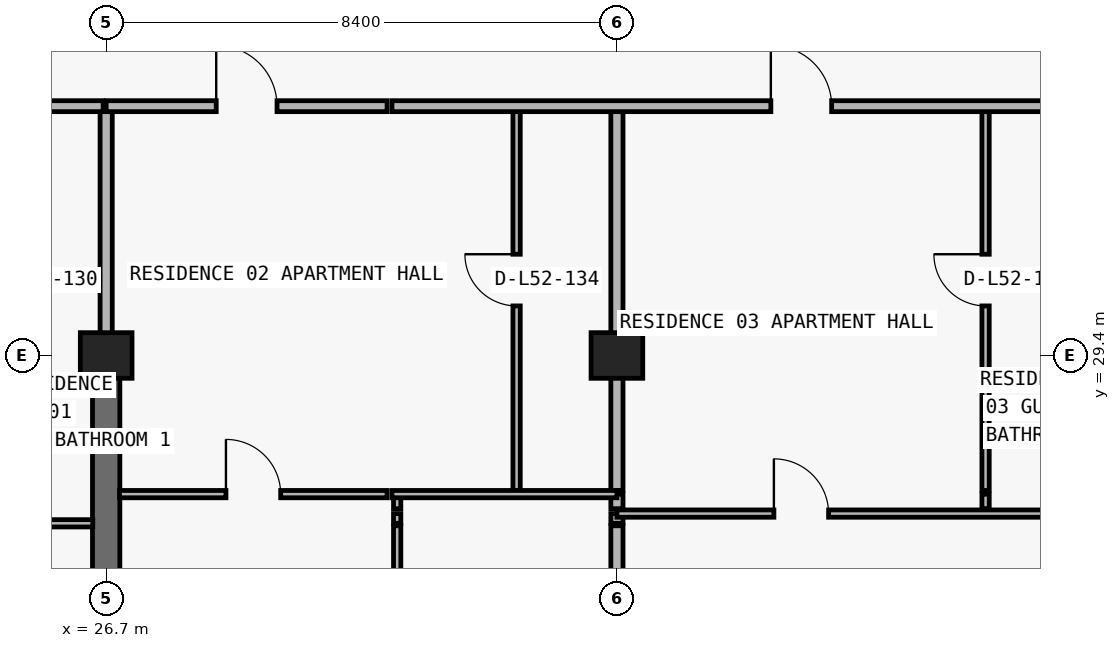
"""IFC4 building model, lengths in metres.
Left out: names, types, materials, properties, quantities, classifications, styles, units other than length and angle.
Written with IfcOpenShell. Run it as: python <this file> out.ifc"""

import sys

from ifc_helpers import new_model, si_unit, direction, frame, frame_2d, origin, origin_2d, place, context, subcontext, project, spatial, rectangle, extrude, element, fill, save


model = new_model("IFC4")
c1 = context("Model", 3, precision=1e-05, world=origin(), true_north=direction((0.0, 1.0)))
c2 = subcontext(c1, "Body", "Model", "MODEL_VIEW")
j1 = project(units=[si_unit("LENGTHUNIT", "METRE"), si_unit("PLANEANGLEUNIT", "RADIAN")], contexts=[c1])
p1 = place(None, origin())
s1 = spatial("IfcSite", under=j1, at=p1, CompositionType="ELEMENT")
p2 = place(p1, origin())
s2 = spatial("IfcBuilding", under=s1, at=p2, CompositionType="ELEMENT")
p3 = place(p2, frame((0.0, 0.0, 188.4)))
s3 = spatial("IfcBuildingStorey", under=s2, at=p3, CompositionType="ELEMENT", Elevation=188.4)
for number, where, z_axis, x_axis in (
    (1, (26.7, 29.4, 0.0), (0.0, 0.0, 1.0), (1.0, 0.0, 0.0)),
    (2, (35.1, 29.4, 0.0), (0.0, 0.0, 1.0), (1.0, 0.0, 0.0)),
):
    element("IfcColumn", number, at=place(p3, frame(where, z_axis=z_axis, x_axis=x_axis)), inside=s3, PredefinedType="COLUMN", context=c2, shape_type="SweptSolid", body=[
        extrude(rectangle(XDim=0.85, YDim=0.75, at=origin_2d()), origin(), (0.0, 0.0, 1.0), 3.05),
    ])
p4 = place(p3, frame((26.7, 20.8, 0.0), z_axis=(0.0, 0.0, 1.0), x_axis=(0.0, 1.0, 0.0)))
e3 = element("IfcWall", 3, at=p4, inside=s3, PredefinedType="SHEAR", context=c2, shape_type="SweptSolid", body=[
    extrude(rectangle(XDim=8.6, YDim=0.45, at=frame_2d((4.3, 0.0))), origin(), (0.0, 0.0, 1.0), 3.05),
])
p5 = place(p3, frame((26.7, 29.405, 0.0), z_axis=(0.0, 0.0, 1.0), x_axis=(0.0, 1.0, 0.0)))
e4 = element("IfcWall", 4, at=p5, inside=s3, PredefinedType="PARTITIONING", context=c2, shape_type="SweptSolid", body=[
    extrude(rectangle(XDim=4.095, YDim=0.2, at=frame_2d((2.047, 0.0))), origin(), (0.0, 0.0, 1.0), 2.335),
])
p6 = place(p3, frame((31.486, 22.24, 0.0), z_axis=(0.0, 0.0, 1.0), x_axis=(0.0, 1.0, 0.0)))
e5 = element("IfcWall", 5, at=p6, inside=s3, PredefinedType="PARTITIONING", context=c2, shape_type="SweptSolid", body=[
    extrude(rectangle(XDim=4.36, YDim=0.12, at=frame_2d((2.18, 0.0))), origin(), (0.0, 0.0, 1.0), 3.05),
])
p7 = place(p6, frame((1.73, 0.0, 0.0)))
e6 = element("IfcOpeningElement", 6, at=p7, cuts=e5, PredefinedType="OPENING", context=c2, shape_type="SweptSolid", body=[
    extrude(rectangle(XDim=0.9, YDim=2.15, at=frame_2d((0.45, 1.075))), frame((0.0, 0.07, 0.0), z_axis=(0.0, -1.0, 0.0), x_axis=(1.0, 0.0, 0.0)), (0.0, 0.0, 1.0), 0.14),
])
p8 = place(p3, frame((31.486, 26.64, 0.0), z_axis=(0.0, 0.0, 1.0), x_axis=(0.0, 1.0, 0.0)))
e7 = element("IfcWall", 7, at=p8, inside=s3, PredefinedType="PARTITIONING", context=c2, shape_type="SweptSolid", body=[
    extrude(rectangle(XDim=0.16, YDim=0.12, at=frame_2d((0.08, 0.0))), origin(), (0.0, 0.0, 1.0), 3.05),
])
p9 = place(p3, frame((31.486, 26.88, 0.0), z_axis=(0.0, 0.0, 1.0), x_axis=(0.0, 1.0, 0.0)))
e8 = element("IfcWall", 8, at=p9, inside=s3, PredefinedType="PARTITIONING", context=c2, shape_type="SweptSolid", body=[
    extrude(rectangle(XDim=0.24, YDim=0.12, at=frame_2d((0.12, 0.0))), origin(), (0.0, 0.0, 1.0), 3.05),
])
p10 = place(p3, frame((33.45, 27.18, 0.0), z_axis=(0.0, 0.0, 1.0), x_axis=(0.0, 1.0, 0.0)))
e9 = element("IfcWall", 9, at=p10, inside=s3, PredefinedType="PARTITIONING", context=c2, shape_type="SweptSolid", body=[
    extrude(rectangle(XDim=6.32, YDim=0.12, at=frame_2d((3.16, 0.0))), origin(), (0.0, 0.0, 1.0), 3.05),
])
p11 = place(p10, frame((3.035, 0.0, 0.0)))
e10 = element("IfcOpeningElement", 10, at=p11, cuts=e9, PredefinedType="OPENING", context=c2, shape_type="SweptSolid", body=[
    extrude(rectangle(XDim=0.85, YDim=2.1, at=frame_2d((0.425, 1.05))), frame((0.0, 0.07, 0.0), z_axis=(0.0, -1.0, 0.0), x_axis=(1.0, 0.0, 0.0)), (0.0, 0.0, 1.0), 0.14),
])
p12 = place(p3, frame((35.1, 22.24, 0.0), z_axis=(0.0, 0.0, 1.0), x_axis=(0.0, 1.0, 0.0)))
e11 = element("IfcWall", 11, at=p12, inside=s3, PredefinedType="PARTITIONING", context=c2, shape_type="SweptSolid", body=[
    extrude(rectangle(XDim=4.36, YDim=0.2, at=frame_2d((2.18, 0.0))), origin(), (0.0, 0.0, 1.0), 2.263),
])
p13 = place(p3, frame((35.1, 26.64, 0.0), z_axis=(0.0, 0.0, 1.0), x_axis=(0.0, 1.0, 0.0)))
e12 = element("IfcWall", 12, at=p13, inside=s3, PredefinedType="PARTITIONING", context=c2, shape_type="SweptSolid", body=[
    extrude(rectangle(XDim=0.16, YDim=0.2, at=frame_2d((0.08, 0.0))), origin(), (0.0, 0.0, 1.0), 2.263),
])
p14 = place(p3, frame((35.1, 26.88, 0.0), z_axis=(0.0, 0.0, 1.0), x_axis=(0.0, 1.0, 0.0)))
e13 = element("IfcWall", 13, at=p14, inside=s3, PredefinedType="PARTITIONING", context=c2, shape_type="SweptSolid", body=[
    extrude(rectangle(XDim=0.24, YDim=0.2, at=frame_2d((0.12, 0.0))), origin(), (0.0, 0.0, 1.0), 2.263),
])
p15 = place(p3, frame((35.1, 27.18, 0.0), z_axis=(0.0, 0.0, 1.0), x_axis=(0.0, 1.0, 0.0)))
e14 = element("IfcWall", 14, at=p15, inside=s3, PredefinedType="PARTITIONING", context=c2, shape_type="SweptSolid", body=[
    extrude(rectangle(XDim=6.32, YDim=0.2, at=frame_2d((3.16, 0.0))), origin(), (0.0, 0.0, 1.0), 2.263),
])
p16 = place(p3, frame((41.163, 26.88, 0.0), z_axis=(0.0, 0.0, 1.0), x_axis=(0.0, 1.0, 0.0)))
e15 = element("IfcWall", 15, at=p16, inside=s3, PredefinedType="PARTITIONING", context=c2, shape_type="SweptSolid", body=[
    extrude(rectangle(XDim=0.24, YDim=0.12, at=frame_2d((0.12, 0.0))), origin(), (0.0, 0.0, 1.0), 3.05),
])
p17 = place(p3, frame((41.163, 27.18, 0.0), z_axis=(0.0, 0.0, 1.0), x_axis=(0.0, 1.0, 0.0)))
e16 = element("IfcWall", 16, at=p17, inside=s3, PredefinedType="PARTITIONING", context=c2, shape_type="SweptSolid", body=[
    extrude(rectangle(XDim=6.32, YDim=0.12, at=frame_2d((3.16, 0.0))), origin(), (0.0, 0.0, 1.0), 3.05),
])
p18 = place(p17, frame((3.035, 0.0, 0.0)))
e17 = element("IfcOpeningElement", 17, at=p18, cuts=e16, PredefinedType="OPENING", context=c2, shape_type="SweptSolid", body=[
    extrude(rectangle(XDim=0.85, YDim=2.1, at=frame_2d((0.425, 1.05))), frame((0.0, 0.07, 0.0), z_axis=(0.0, -1.0, 0.0), x_axis=(1.0, 0.0, 0.0)), (0.0, 0.0, 1.0), 0.14),
])
p19 = place(p3, frame((18.3, 26.64, 0.0), z_axis=(0.0, 0.0, 1.0), x_axis=(1.0, 0.0, 0.0)))
e18 = element("IfcWall", 18, at=p19, inside=s3, PredefinedType="PARTITIONING", context=c2, shape_type="SweptSolid", body=[
    extrude(rectangle(XDim=8.18, YDim=0.12, at=frame_2d((4.09, 0.0))), origin(), (0.0, 0.0, 1.0), 3.05),
])
p20 = place(p19, frame((3.0, 0.0, 0.0)))
e19 = element("IfcOpeningElement", 19, at=p20, cuts=e18, PredefinedType="OPENING", context=c2, shape_type="SweptSolid", body=[
    extrude(rectangle(XDim=0.9, YDim=2.15, at=frame_2d((0.45, 1.075))), frame((0.0, 0.07, 0.0), z_axis=(0.0, -1.0, 0.0), x_axis=(1.0, 0.0, 0.0)), (0.0, 0.0, 1.0), 0.14),
])
p21 = place(p3, frame((35.1, 26.8, 0.0), z_axis=(0.0, 0.0, 1.0), x_axis=(1.0, 0.0, 0.0)))
e20 = element("IfcWall", 20, at=p21, inside=s3, PredefinedType="PARTITIONING", context=c2, shape_type="SweptSolid", body=[
    extrude(rectangle(XDim=7.595, YDim=0.12, at=frame_2d((3.797, 0.0))), origin(), (0.0, 0.0, 1.0), 3.05),
])
p22 = place(p21, frame((2.582, 0.0, 0.0)))
e21 = element("IfcOpeningElement", 21, at=p22, cuts=e20, PredefinedType="OPENING", context=c2, shape_type="SweptSolid", body=[
    extrude(rectangle(XDim=0.9, YDim=2.15, at=frame_2d((0.45, 1.075))), frame((0.0, 0.07, 0.0), z_axis=(0.0, -1.0, 0.0), x_axis=(1.0, 0.0, 0.0)), (0.0, 0.0, 1.0), 0.14),
])
p23 = place(p3, frame((26.92, 27.12, 0.0), z_axis=(0.0, 0.0, 1.0), x_axis=(1.0, 0.0, 0.0)))
e22 = element("IfcWall", 22, at=p23, inside=s3, PredefinedType="PARTITIONING", context=c2, shape_type="SweptSolid", body=[
    extrude(rectangle(XDim=4.4, YDim=0.12, at=frame_2d((2.2, 0.0))), origin(), (0.0, 0.0, 1.0), 3.05),
])
p24 = place(p23, frame((1.75, 0.0, 0.0)))
e23 = element("IfcOpeningElement", 23, at=p24, cuts=e22, PredefinedType="OPENING", context=c2, shape_type="SweptSolid", body=[
    extrude(rectangle(XDim=0.9, YDim=2.15, at=frame_2d((0.45, 1.075))), frame((0.0, 0.07, 0.0), z_axis=(0.0, -1.0, 0.0), x_axis=(1.0, 0.0, 0.0)), (0.0, 0.0, 1.0), 0.14),
])
p25 = place(p3, frame((31.4, 27.12, 0.0), z_axis=(0.0, 0.0, 1.0), x_axis=(1.0, 0.0, 0.0)))
e24 = element("IfcWall", 24, at=p25, inside=s3, PredefinedType="PARTITIONING", context=c2, shape_type="SweptSolid", body=[
    extrude(rectangle(XDim=3.7, YDim=0.12, at=frame_2d((1.85, 0.0))), origin(), (0.0, 0.0, 1.0), 3.05),
])
p26 = place(p3, frame((10.105, 33.5, 0.0), z_axis=(0.0, 0.0, 1.0), x_axis=(1.0, 0.0, 0.0)))
e25 = element("IfcWall", 25, at=p26, inside=s3, PredefinedType="PARTITIONING", context=c2, shape_type="SweptSolid", body=[
    extrude(rectangle(XDim=16.545, YDim=0.18, at=frame_2d((8.272, 0.0))), origin(), (0.0, 0.0, 1.0), 3.05),
])
p27 = place(p26, frame((2.824, 0.0, 0.0)))
e26 = element("IfcOpeningElement", 26, at=p27, cuts=e25, PredefinedType="OPENING", context=c2, shape_type="SweptSolid", body=[
    extrude(rectangle(XDim=1.0, YDim=2.2, at=frame_2d((0.5, 1.1))), frame((0.0, 0.1, 0.0), z_axis=(0.0, -1.0, 0.0), x_axis=(1.0, 0.0, 0.0)), (0.0, 0.0, 1.0), 0.2),
])
p28 = place(p3, frame((26.7, 33.5, 0.0), z_axis=(0.0, 0.0, 1.0), x_axis=(1.0, 0.0, 0.0)))
e27 = element("IfcWall", 27, at=p28, inside=s3, PredefinedType="PARTITIONING", context=c2, shape_type="SweptSolid", body=[
    extrude(rectangle(XDim=4.62, YDim=0.18, at=frame_2d((2.31, 0.0))), origin(), (0.0, 0.0, 1.0), 3.05),
])
p29 = place(p28, frame((1.81, 0.0, 0.0)))
e28 = element("IfcOpeningElement", 28, at=p29, cuts=e27, PredefinedType="OPENING", context=c2, shape_type="SweptSolid", body=[
    extrude(rectangle(XDim=1.0, YDim=2.2, at=frame_2d((0.5, 1.1))), frame((0.0, 0.1, 0.0), z_axis=(0.0, -1.0, 0.0), x_axis=(1.0, 0.0, 0.0)), (0.0, 0.0, 1.0), 0.2),
])
p30 = place(p3, frame((31.4, 33.5, 0.0), z_axis=(0.0, 0.0, 1.0), x_axis=(1.0, 0.0, 0.0)))
e29 = element("IfcWall", 29, at=p30, inside=s3, PredefinedType="PARTITIONING", context=c2, shape_type="SweptSolid", body=[
    extrude(rectangle(XDim=36.3, YDim=0.18, at=frame_2d((18.15, 0.0))), origin(), (0.0, 0.0, 1.0), 3.05),
])
p31 = place(p30, frame((6.231, 0.0, 0.0)))
e30 = element("IfcOpeningElement", 30, at=p31, cuts=e29, PredefinedType="OPENING", context=c2, shape_type="SweptSolid", body=[
    extrude(rectangle(XDim=1.0, YDim=2.2, at=frame_2d((0.5, 1.1))), frame((0.0, 0.1, 0.0), z_axis=(0.0, -1.0, 0.0), x_axis=(1.0, 0.0, 0.0)), (0.0, 0.0, 1.0), 0.2),
])
p32 = place(p30, frame((22.575, 0.0, 0.0)))
e31 = element("IfcOpeningElement", 31, at=p32, cuts=e29, PredefinedType="OPENING", context=c2, shape_type="SweptSolid", body=[
    extrude(rectangle(XDim=1.0, YDim=2.2, at=frame_2d((0.5, 1.1))), frame((0.0, 0.1, 0.0), z_axis=(0.0, -1.0, 0.0), x_axis=(1.0, 0.0, 0.0)), (0.0, 0.0, 1.0), 0.2),
])
p33 = place(p30, frame((30.875, 0.0, 0.0)))
e32 = element("IfcOpeningElement", 32, at=p33, cuts=e29, PredefinedType="OPENING", context=c2, shape_type="SweptSolid", body=[
    extrude(rectangle(XDim=1.0, YDim=2.2, at=frame_2d((0.5, 1.1))), frame((0.0, 0.1, 0.0), z_axis=(0.0, -1.0, 0.0), x_axis=(1.0, 0.0, 0.0)), (0.0, 0.0, 1.0), 0.2),
])
p34 = place(p29, origin())
e33 = element("IfcDoor", 33, at=p34, inside=s3, OperationType="SINGLE_SWING_LEFT", PredefinedType="DOOR", context=c2, shape_type="SweptSolid", body=[
    extrude(rectangle(XDim=1.0, YDim=2.2, at=frame_2d((0.5, 1.1))), frame((0.0, 0.025, 0.0), z_axis=(0.0, -1.0, 0.0), x_axis=(1.0, 0.0, 0.0)), (0.0, 0.0, 1.0), 0.05),
])
fill(e28, e33)
p35 = place(p11, origin())
e34 = element("IfcDoor", 34, at=p35, inside=s3, OperationType="SINGLE_SWING_RIGHT", PredefinedType="DOOR", context=c2, shape_type="SweptSolid", body=[
    extrude(rectangle(XDim=0.85, YDim=2.1, at=frame_2d((0.425, 1.05))), frame((0.0, 0.025, 0.0), z_axis=(0.0, -1.0, 0.0), x_axis=(1.0, 0.0, 0.0)), (0.0, 0.0, 1.0), 0.05),
])
fill(e10, e34)
p36 = place(p24, origin())
e35 = element("IfcDoor", 35, at=p36, inside=s3, OperationType="SINGLE_SWING_LEFT", PredefinedType="DOOR", context=c2, shape_type="SweptSolid", body=[
    extrude(rectangle(XDim=0.9, YDim=2.15, at=frame_2d((0.45, 1.075))), frame((0.0, 0.025, 0.0), z_axis=(0.0, -1.0, 0.0), x_axis=(1.0, 0.0, 0.0)), (0.0, 0.0, 1.0), 0.05),
])
fill(e23, e35)
p37 = place(p31, origin())
e36 = element("IfcDoor", 36, at=p37, inside=s3, OperationType="SINGLE_SWING_LEFT", PredefinedType="DOOR", context=c2, shape_type="SweptSolid", body=[
    extrude(rectangle(XDim=1.0, YDim=2.2, at=frame_2d((0.5, 1.1))), frame((0.0, 0.025, 0.0), z_axis=(0.0, -1.0, 0.0), x_axis=(1.0, 0.0, 0.0)), (0.0, 0.0, 1.0), 0.05),
])
fill(e30, e36)
p38 = place(p18, origin())
e37 = element("IfcDoor", 37, at=p38, inside=s3, OperationType="SINGLE_SWING_RIGHT", PredefinedType="DOOR", context=c2, shape_type="SweptSolid", body=[
    extrude(rectangle(XDim=0.85, YDim=2.1, at=frame_2d((0.425, 1.05))), frame((0.0, 0.025, 0.0), z_axis=(0.0, -1.0, 0.0), x_axis=(1.0, 0.0, 0.0)), (0.0, 0.0, 1.0), 0.05),
])
fill(e17, e37)
p39 = place(p22, origin())
e38 = element("IfcDoor", 38, at=p39, inside=s3, OperationType="SINGLE_SWING_LEFT", PredefinedType="DOOR", context=c2, shape_type="SweptSolid", body=[
    extrude(rectangle(XDim=0.9, YDim=2.15, at=frame_2d((0.45, 1.075))), frame((0.0, 0.025, 0.0), z_axis=(0.0, -1.0, 0.0), x_axis=(1.0, 0.0, 0.0)), (0.0, 0.0, 1.0), 0.05),
])
fill(e21, e38)
save(model, sys.argv[1])
